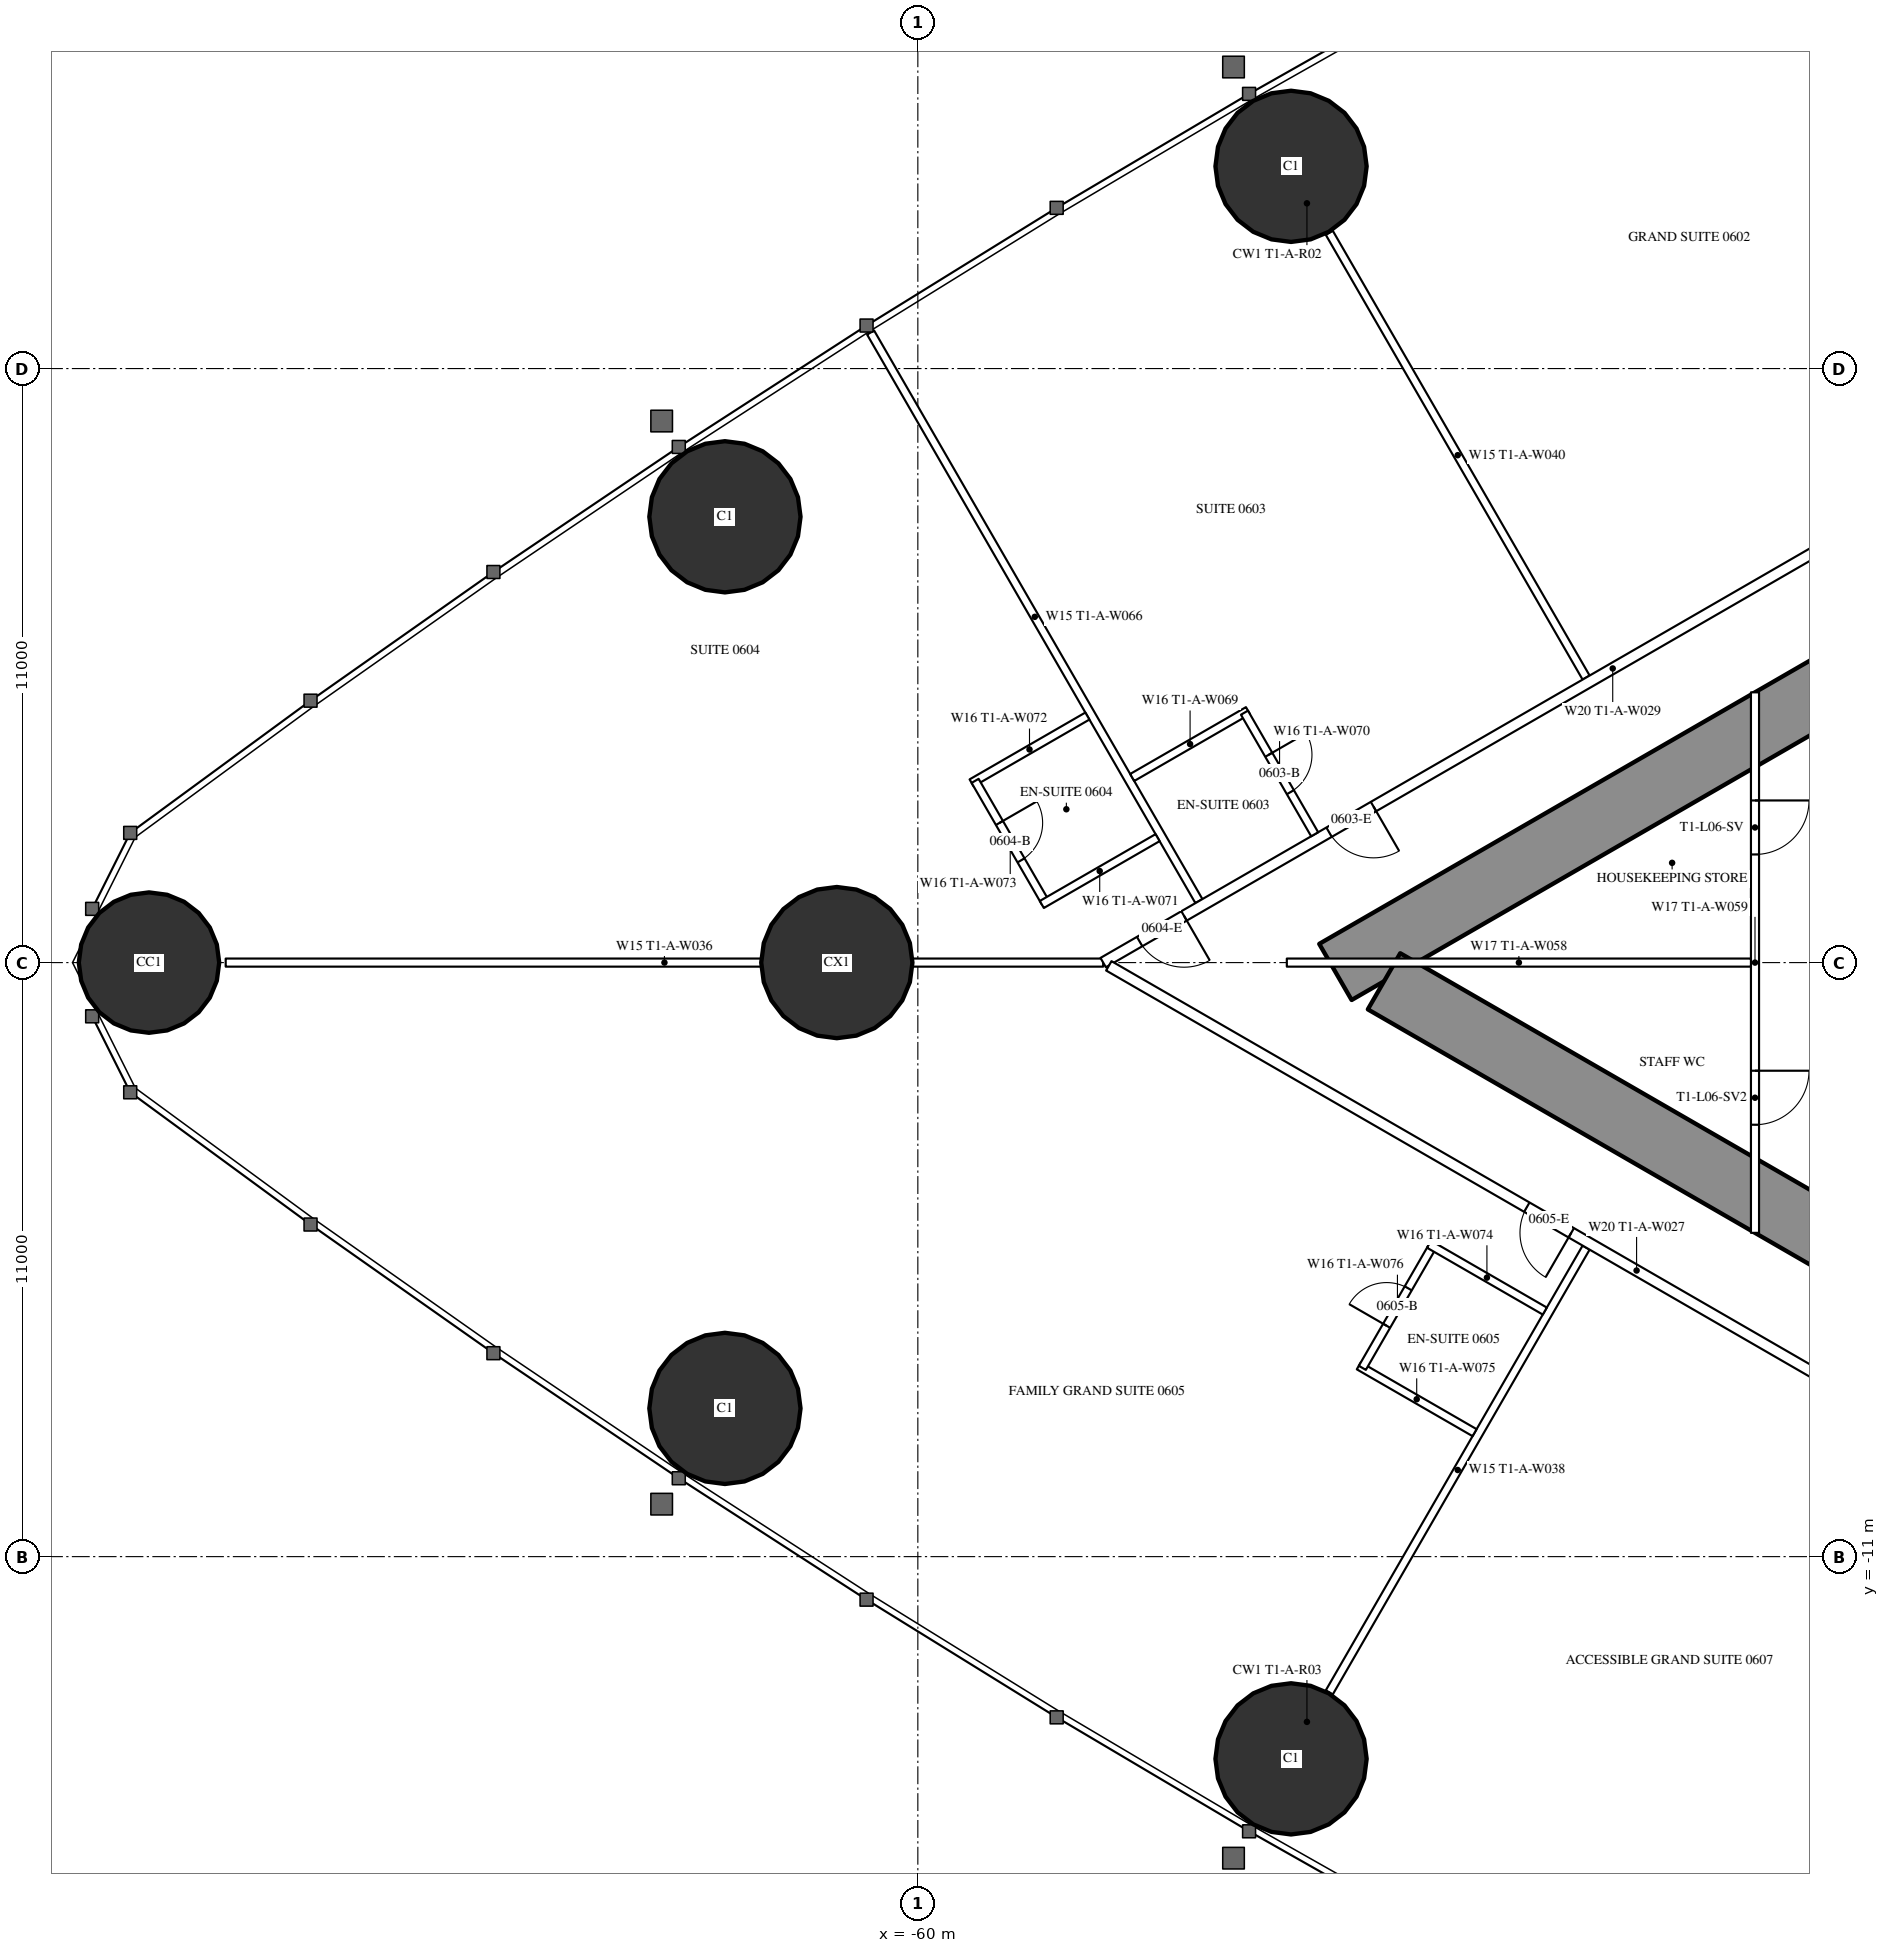
"""IFC4 building model, lengths in metres.
Left out: names, types, materials, properties, quantities, classifications, styles, units other than length and angle.
Written with IfcOpenShell. Run it as: python <this file> out.ifc"""

import sys

from ifc_helpers import new_model, si_unit, direction, frame, frame_2d, origin, origin_2d, place, context, subcontext, project, spatial, rectangle, hollow_circle, extrude, element, fill, save


model = new_model("IFC4")
c1 = context("Model", 3, precision=1e-05, world=origin(), true_north=direction((0.0, 1.0)))
c2 = subcontext(c1, "Body", "Model", "MODEL_VIEW")
j1 = project(units=[si_unit("LENGTHUNIT", "METRE"), si_unit("PLANEANGLEUNIT", "RADIAN")], contexts=[c1])
p1 = place(None, origin())
s1 = spatial("IfcSite", under=j1, at=p1, CompositionType="ELEMENT")
p2 = place(p1, origin())
s2 = spatial("IfcBuilding", under=s1, at=p2, CompositionType="ELEMENT")
p3 = place(p2, frame((0.0, 0.0, 28.5)))
s3 = spatial("IfcBuildingStorey", under=s2, at=p3, CompositionType="ELEMENT", Elevation=28.5)
p4 = place(p3, frame((-74.235, 0.0, 0.0), z_axis=(0.0, 0.0, 1.0), x_axis=(1.0, 0.0, 0.0)))
e1 = element("IfcColumn", 1, at=p4, inside=s3, PredefinedType="COLUMN", context=c2, shape_type="SweptSolid", body=[
    extrude(hollow_circle(Radius=1.3, WallThickness=0.1, at=origin_2d()), origin(), (0.0, 0.0, 1.0), 3.5),
])
for number, where, z_axis, x_axis in (
    (2, (-63.572, -8.255, 0.0), (0.0, 0.0, 1.0), (1.0, 0.0, 0.0)),
    (3, (-53.09, -14.745, 0.0), (0.0, 0.0, 1.0), (1.0, 0.0, 0.0)),
    (4, (-53.09, 14.745, 0.0), (0.0, 0.0, 1.0), (1.0, 0.0, 0.0)),
    (5, (-63.572, 8.255, 0.0), (0.0, 0.0, 1.0), (1.0, 0.0, 0.0)),
):
    element("IfcColumn", number, at=place(p3, frame(where, z_axis=z_axis, x_axis=x_axis)), inside=s3, PredefinedType="COLUMN", context=c2, shape_type="SweptSolid", body=[
        extrude(hollow_circle(Radius=1.4, WallThickness=0.12, at=origin_2d()), origin(), (0.0, 0.0, 1.0), 3.5),
    ])
p5 = place(p3, frame((-61.5, 0.0, 0.0), z_axis=(0.0, 0.0, 1.0), x_axis=(1.0, 0.0, 0.0)))
e6 = element("IfcColumn", 6, at=p5, inside=s3, PredefinedType="COLUMN", context=c2, shape_type="SweptSolid", body=[
    extrude(hollow_circle(Radius=1.4, WallThickness=0.1, at=origin_2d()), origin(), (0.0, 0.0, 1.0), 3.5),
])
p6 = place(p3, frame((-27.2, 14.3, 0.0), z_axis=(0.0, 0.0, 1.0), x_axis=(-0.866026593062, -0.499997940104, 0.0)))
e7 = element("IfcWall", 7, at=p6, inside=s3, PredefinedType="SHEAR", context=c2, shape_type="SweptSolid", body=[
    extrude(rectangle(XDim=28.946, YDim=1.2, at=frame_2d((14.473, 0.0))), origin(), (0.0, 0.0, 1.0), 3.5),
])
p7 = place(p6, frame((4.6, 0.0, 0.0)))
e8 = element("IfcOpeningElement", 8, at=p7, cuts=e7, PredefinedType="OPENING", context=c2, shape_type="SweptSolid", body=[
    extrude(rectangle(XDim=1.0, YDim=2.2, at=frame_2d((0.5, 1.1))), frame((0.0, 0.61, 0.0), z_axis=(0.0, -1.0, 0.0), x_axis=(1.0, 0.0, 0.0)), (0.0, 0.0, 1.0), 1.22),
])
p8 = place(p6, frame((13.395, 0.0, 0.0)))
e9 = element("IfcOpeningElement", 9, at=p8, cuts=e7, PredefinedType="OPENING", context=c2, shape_type="SweptSolid", body=[
    extrude(rectangle(XDim=1.8, YDim=2.2, at=frame_2d((0.9, 1.1))), frame((0.0, 0.61, 0.0), z_axis=(0.0, -1.0, 0.0), x_axis=(1.0, 0.0, 0.0)), (0.0, 0.0, 1.0), 1.22),
])
p9 = place(p3, frame((-27.2, -14.3, 0.0), z_axis=(0.0, 0.0, 1.0), x_axis=(-0.866024021859, 0.500002393557, 0.0)))
e10 = element("IfcWall", 10, at=p9, inside=s3, PredefinedType="SHEAR", context=c2, shape_type="SweptSolid", body=[
    extrude(rectangle(XDim=27.907, YDim=1.2, at=frame_2d((13.954, 0.0))), origin(), (0.0, 0.0, 1.0), 3.5),
])
p10 = place(p9, frame((4.6, 0.0, 0.0)))
e11 = element("IfcOpeningElement", 11, at=p10, cuts=e10, PredefinedType="OPENING", context=c2, shape_type="SweptSolid", body=[
    extrude(rectangle(XDim=1.0, YDim=2.2, at=frame_2d((0.5, 1.1))), frame((0.0, 0.61, 0.0), z_axis=(0.0, -1.0, 0.0), x_axis=(1.0, 0.0, 0.0)), (0.0, 0.0, 1.0), 1.22),
])
p11 = place(p9, frame((13.395, 0.0, 0.0)))
e12 = element("IfcOpeningElement", 12, at=p11, cuts=e10, PredefinedType="OPENING", context=c2, shape_type="SweptSolid", body=[
    extrude(rectangle(XDim=1.8, YDim=2.2, at=frame_2d((0.9, 1.1))), frame((0.0, 0.61, 0.0), z_axis=(0.0, -1.0, 0.0), x_axis=(1.0, 0.0, 0.0)), (0.0, 0.0, 1.0), 1.22),
])
p12 = place(p3, frame((-47.627, 5.278, 0.0), z_axis=(0.0, 0.0, 1.0), x_axis=(-0.500009844318, 0.86601972009, 0.0)))
e13 = element("IfcWall", 13, at=p12, inside=s3, PredefinedType="PARTITIONING", context=c2, shape_type="SweptSolid", body=[
    extrude(rectangle(XDim=9.51, YDim=0.15, at=frame_2d((4.755, 0.0))), origin(), (0.0, 0.0, 1.0), 2.25),
])
p13 = place(p3, frame((-54.796, 1.139, 0.0), z_axis=(0.0, 0.0, 1.0), x_axis=(-0.499998860433, 0.866026061713, 0.0)))
e14 = element("IfcWall", 14, at=p13, inside=s3, PredefinedType="PARTITIONING", context=c2, shape_type="SweptSolid", body=[
    extrude(rectangle(XDim=12.157, YDim=0.15, at=frame_2d((6.078, 0.0))), origin(), (0.0, 0.0, 1.0), 3.25),
])
p14 = place(p3, frame((-47.627, -5.278, 0.0), z_axis=(0.0, 0.0, 1.0), x_axis=(-0.500009844318, -0.86601972009, 0.0)))
e15 = element("IfcWall", 15, at=p14, inside=s3, PredefinedType="PARTITIONING", context=c2, shape_type="SweptSolid", body=[
    extrude(rectangle(XDim=9.51, YDim=0.15, at=frame_2d((4.755, 0.0))), origin(), (0.0, 0.0, 1.0), 2.25),
])
p15 = place(p3, frame((-56.568, 0.0, 0.0), z_axis=(0.0, 0.0, 1.0), x_axis=(-1.0, 0.0, 0.0)))
e16 = element("IfcWall", 16, at=p15, inside=s3, PredefinedType="PARTITIONING", context=c2, shape_type="SweptSolid", body=[
    extrude(rectangle(XDim=16.247, YDim=0.15, at=frame_2d((8.124, 0.0))), origin(), (0.0, 0.0, 1.0), 2.25),
])
p16 = place(p3, frame((-37.7, 10.894, 0.0), z_axis=(0.0, 0.0, 1.0), x_axis=(-0.866027905338, -0.499995667157, 0.0)))
e17 = element("IfcWall", 17, at=p16, inside=s3, PredefinedType="PARTITIONING", context=c2, shape_type="SweptSolid", body=[
    extrude(rectangle(XDim=21.787, YDim=0.2, at=frame_2d((10.894, 0.0))), origin(), (0.0, 0.0, 1.0), 3.25),
])
p17 = place(p16, frame((16.008, 0.0, 0.0)))
e18 = element("IfcOpeningElement", 18, at=p17, cuts=e17, PredefinedType="OPENING", context=c2, shape_type="SweptSolid", body=[
    extrude(rectangle(XDim=0.95, YDim=2.2, at=frame_2d((0.475, 1.1))), frame((0.0, 0.11, 0.0), z_axis=(0.0, -1.0, 0.0), x_axis=(1.0, 0.0, 0.0)), (0.0, 0.0, 1.0), 0.22),
])
p18 = place(p16, frame((20.058, 0.0, 0.0)))
e19 = element("IfcOpeningElement", 19, at=p18, cuts=e17, PredefinedType="OPENING", context=c2, shape_type="SweptSolid", body=[
    extrude(rectangle(XDim=0.95, YDim=2.2, at=frame_2d((0.475, 1.1))), frame((0.0, 0.11, 0.0), z_axis=(0.0, -1.0, 0.0), x_axis=(1.0, 0.0, 0.0)), (0.0, 0.0, 1.0), 0.22),
])
p19 = place(p16, frame((2.95, 0.0, 0.0)))
e20 = element("IfcOpeningElement", 20, at=p19, cuts=e17, PredefinedType="OPENING", context=c2, shape_type="SweptSolid", body=[
    extrude(rectangle(XDim=0.95, YDim=2.2, at=frame_2d((0.475, 1.1))), frame((0.0, 0.11, 0.0), z_axis=(0.0, -1.0, 0.0), x_axis=(1.0, 0.0, 0.0)), (0.0, 0.0, 1.0), 0.22),
])
p20 = place(p3, frame((-36.92, -11.344, 0.0), z_axis=(0.0, 0.0, 1.0), x_axis=(-0.866028313256, 0.499994960614, 0.0)))
e21 = element("IfcWall", 21, at=p20, inside=s3, PredefinedType="PARTITIONING", context=c2, shape_type="SweptSolid", body=[
    extrude(rectangle(XDim=22.568, YDim=0.2, at=frame_2d((11.284, 0.0))), origin(), (0.0, 0.0, 1.0), 3.25),
])
p21 = place(p20, frame((12.68, 0.0, 0.0)))
e22 = element("IfcOpeningElement", 22, at=p21, cuts=e21, PredefinedType="OPENING", context=c2, shape_type="SweptSolid", body=[
    extrude(rectangle(XDim=0.95, YDim=2.2, at=frame_2d((0.475, 1.1))), frame((0.0, 0.11, 0.0), z_axis=(0.0, -1.0, 0.0), x_axis=(1.0, 0.0, 0.0)), (0.0, 0.0, 1.0), 0.22),
])
p22 = place(p20, frame((3.35, 0.0, 0.0)))
e23 = element("IfcOpeningElement", 23, at=p22, cuts=e21, PredefinedType="OPENING", context=c2, shape_type="SweptSolid", body=[
    extrude(rectangle(XDim=1.0, YDim=2.2, at=frame_2d((0.5, 1.1))), frame((0.0, 0.11, 0.0), z_axis=(0.0, -1.0, 0.0), x_axis=(1.0, 0.0, 0.0)), (0.0, 0.0, 1.0), 0.22),
])
p23 = place(p3, frame((-53.888, 4.665, 0.0), z_axis=(0.0, 0.0, 1.0), x_axis=(-0.866006523861, -0.500032699561, 0.0)))
e24 = element("IfcWall", 24, at=p23, inside=s3, PredefinedType="PARTITIONING", context=c2, shape_type="SweptSolid", body=[
    extrude(rectangle(XDim=2.475, YDim=0.15, at=frame_2d((1.237, 0.0))), origin(), (0.0, 0.0, 1.0), 3.25),
])
p24 = place(p3, frame((-52.653, 2.376, 0.0), z_axis=(0.0, 0.0, 1.0), x_axis=(-0.500006934395, 0.866021400173, 0.0)))
e25 = element("IfcWall", 25, at=p24, inside=s3, PredefinedType="PARTITIONING", context=c2, shape_type="SweptSolid", body=[
    extrude(rectangle(XDim=2.6, YDim=0.15, at=frame_2d((1.3, 0.0))), origin(), (0.0, 0.0, 1.0), 3.25),
])
p25 = place(p24, frame((0.9, 0.0, 0.0)))
e26 = element("IfcOpeningElement", 26, at=p25, cuts=e25, PredefinedType="OPENING", context=c2, shape_type="SweptSolid", body=[
    extrude(rectangle(XDim=0.8, YDim=2.2, at=frame_2d((0.4, 1.1))), frame((0.0, 0.085, 0.0), z_axis=(0.0, -1.0, 0.0), x_axis=(1.0, 0.0, 0.0)), (0.0, 0.0, 1.0), 0.17),
])
p26 = place(p3, frame((-56.861, 4.565, 0.0), z_axis=(0.0, 0.0, 1.0), x_axis=(-0.86604923931, -0.499958713387, 0.0)))
e27 = element("IfcWall", 27, at=p26, inside=s3, PredefinedType="PARTITIONING", context=c2, shape_type="SweptSolid", body=[
    extrude(rectangle(XDim=2.475, YDim=0.15, at=frame_2d((1.237, 0.0))), origin(), (0.0, 0.0, 1.0), 3.25),
])
p27 = place(p3, frame((-57.639, 1.114, 0.0), z_axis=(0.0, 0.0, 1.0), x_axis=(-0.500006934395, 0.866021400173, 0.0)))
e28 = element("IfcWall", 28, at=p27, inside=s3, PredefinedType="PARTITIONING", context=c2, shape_type="SweptSolid", body=[
    extrude(rectangle(XDim=2.6, YDim=0.15, at=frame_2d((1.3, 0.0))), origin(), (0.0, 0.0, 1.0), 3.25),
])
p28 = place(p27, frame((0.9, 0.0, 0.0)))
e29 = element("IfcOpeningElement", 29, at=p28, cuts=e28, PredefinedType="OPENING", context=c2, shape_type="SweptSolid", body=[
    extrude(rectangle(XDim=0.8, YDim=2.2, at=frame_2d((0.4, 1.1))), frame((0.0, 0.085, 0.0), z_axis=(0.0, -1.0, 0.0), x_axis=(1.0, 0.0, 0.0)), (0.0, 0.0, 1.0), 0.17),
])
p29 = place(p3, frame((-55.561, 2.313, 0.0), z_axis=(0.0, 0.0, 1.0), x_axis=(-0.86604923931, -0.499958713387, 0.0)))
e30 = element("IfcWall", 30, at=p29, inside=s3, PredefinedType="PARTITIONING", context=c2, shape_type="SweptSolid", body=[
    extrude(rectangle(XDim=2.475, YDim=0.15, at=frame_2d((1.237, 0.0))), origin(), (0.0, 0.0, 1.0), 3.25),
])
p30 = place(p3, frame((-49.692, -8.704, 0.0), z_axis=(0.0, 0.0, 1.0), x_axis=(-0.866073894602, 0.499916002032, 0.0)))
e31 = element("IfcWall", 31, at=p30, inside=s3, PredefinedType="PARTITIONING", context=c2, shape_type="SweptSolid", body=[
    extrude(rectangle(XDim=2.475, YDim=0.15, at=frame_2d((1.238, 0.0))), origin(), (0.0, 0.0, 1.0), 3.25),
])
p31 = place(p3, frame((-50.47, -5.253, 0.0), z_axis=(0.0, 0.0, 1.0), x_axis=(-0.500006934395, -0.866021400173, 0.0)))
e32 = element("IfcWall", 32, at=p31, inside=s3, PredefinedType="PARTITIONING", context=c2, shape_type="SweptSolid", body=[
    extrude(rectangle(XDim=2.6, YDim=0.15, at=frame_2d((1.3, 0.0))), origin(), (0.0, 0.0, 1.0), 3.25),
])
p32 = place(p31, frame((0.9, 0.0, 0.0)))
e33 = element("IfcOpeningElement", 33, at=p32, cuts=e32, PredefinedType="OPENING", context=c2, shape_type="SweptSolid", body=[
    extrude(rectangle(XDim=0.8, YDim=2.2, at=frame_2d((0.4, 1.1))), frame((0.0, 0.085, 0.0), z_axis=(0.0, -1.0, 0.0), x_axis=(1.0, 0.0, 0.0)), (0.0, 0.0, 1.0), 0.17),
])
p33 = place(p3, frame((-48.392, -6.453, 0.0), z_axis=(0.0, 0.0, 1.0), x_axis=(-0.86604923931, 0.499958713387, 0.0)))
e34 = element("IfcWall", 34, at=p33, inside=s3, PredefinedType="PARTITIONING", context=c2, shape_type="SweptSolid", body=[
    extrude(rectangle(XDim=2.475, YDim=0.15, at=frame_2d((1.237, 0.0))), origin(), (0.0, 0.0, 1.0), 3.25),
])
p34 = place(p3, frame((-44.5, 5.005, 0.0), z_axis=(0.0, 0.0, 1.0), x_axis=(0.0, -1.0, 0.0)))
e35 = element("IfcWall", 35, at=p34, inside=s3, PredefinedType="PARTITIONING", context=c2, shape_type="SweptSolid", body=[
    extrude(rectangle(XDim=10.009, YDim=0.15, at=frame_2d((5.005, 0.0))), origin(), (0.0, 0.0, 1.0), 2.45),
])
p35 = place(p34, frame((2.002, 0.0, 0.0)))
e36 = element("IfcOpeningElement", 36, at=p35, cuts=e35, PredefinedType="OPENING", context=c2, shape_type="SweptSolid", body=[
    extrude(rectangle(XDim=1.0, YDim=2.2, at=frame_2d((0.5, 1.1))), frame((0.0, 0.085, 0.0), z_axis=(0.0, -1.0, 0.0), x_axis=(1.0, 0.0, 0.0)), (0.0, 0.0, 1.0), 0.17),
])
p36 = place(p34, frame((7.007, 0.0, 0.0)))
e37 = element("IfcOpeningElement", 37, at=p36, cuts=e35, PredefinedType="OPENING", context=c2, shape_type="SweptSolid", body=[
    extrude(rectangle(XDim=1.0, YDim=2.2, at=frame_2d((0.5, 1.1))), frame((0.0, 0.085, 0.0), z_axis=(0.0, -1.0, 0.0), x_axis=(1.0, 0.0, 0.0)), (0.0, 0.0, 1.0), 0.17),
])
p37 = place(p3, frame((-44.575, 0.0, 0.0), z_axis=(0.0, 0.0, 1.0), x_axis=(-1.0, 0.0, 0.0)))
e38 = element("IfcWall", 38, at=p37, inside=s3, PredefinedType="PARTITIONING", context=c2, shape_type="SweptSolid", body=[
    extrude(rectangle(XDim=8.593, YDim=0.15, at=frame_2d((4.297, 0.0))), origin(), (0.0, 0.0, 1.0), 2.25),
])
p38 = place(p25, origin())
e39 = element("IfcDoor", 39, at=p38, inside=s3, OperationType="SINGLE_SWING_RIGHT", PredefinedType="DOOR", context=c2, shape_type="SweptSolid", body=[
    extrude(rectangle(XDim=0.8, YDim=2.2, at=frame_2d((0.4, 1.1))), frame((0.0, 0.025, 0.0), z_axis=(0.0, -1.0, 0.0), x_axis=(1.0, 0.0, 0.0)), (0.0, 0.0, 1.0), 0.05),
])
fill(e26, e39)
p39 = place(p17, origin())
e40 = element("IfcDoor", 40, at=p39, inside=s3, OperationType="SINGLE_SWING_LEFT", PredefinedType="DOOR", context=c2, shape_type="SweptSolid", body=[
    extrude(rectangle(XDim=0.95, YDim=2.2, at=frame_2d((0.475, 1.1))), frame((0.0, 0.025, 0.0), z_axis=(0.0, -1.0, 0.0), x_axis=(1.0, 0.0, 0.0)), (0.0, 0.0, 1.0), 0.05),
])
fill(e18, e40)
p40 = place(p28, origin())
e41 = element("IfcDoor", 41, at=p40, inside=s3, OperationType="SINGLE_SWING_RIGHT", PredefinedType="DOOR", context=c2, shape_type="SweptSolid", body=[
    extrude(rectangle(XDim=0.8, YDim=2.2, at=frame_2d((0.4, 1.1))), frame((0.0, 0.025, 0.0), z_axis=(0.0, -1.0, 0.0), x_axis=(1.0, 0.0, 0.0)), (0.0, 0.0, 1.0), 0.05),
])
fill(e29, e41)
p41 = place(p18, origin())
e42 = element("IfcDoor", 42, at=p41, inside=s3, OperationType="SINGLE_SWING_LEFT", PredefinedType="DOOR", context=c2, shape_type="SweptSolid", body=[
    extrude(rectangle(XDim=0.95, YDim=2.2, at=frame_2d((0.475, 1.1))), frame((0.0, 0.025, 0.0), z_axis=(0.0, -1.0, 0.0), x_axis=(1.0, 0.0, 0.0)), (0.0, 0.0, 1.0), 0.05),
])
fill(e19, e42)
p42 = place(p32, origin())
e43 = element("IfcDoor", 43, at=p42, inside=s3, OperationType="SINGLE_SWING_RIGHT", PredefinedType="DOOR", context=c2, shape_type="SweptSolid", body=[
    extrude(rectangle(XDim=0.8, YDim=2.2, at=frame_2d((0.4, 1.1))), frame((0.0, 0.025, 0.0), z_axis=(0.0, -1.0, 0.0), x_axis=(1.0, 0.0, 0.0)), (0.0, 0.0, 1.0), 0.05),
])
fill(e33, e43)
p43 = place(p21, origin())
e44 = element("IfcDoor", 44, at=p43, inside=s3, OperationType="SINGLE_SWING_LEFT", PredefinedType="DOOR", context=c2, shape_type="SweptSolid", body=[
    extrude(rectangle(XDim=0.95, YDim=2.2, at=frame_2d((0.475, 1.1))), frame((0.0, 0.025, 0.0), z_axis=(0.0, -1.0, 0.0), x_axis=(1.0, 0.0, 0.0)), (0.0, 0.0, 1.0), 0.05),
])
fill(e22, e44)
p44 = place(p35, origin())
e45 = element("IfcDoor", 45, at=p44, inside=s3, OperationType="SINGLE_SWING_LEFT", PredefinedType="DOOR", context=c2, shape_type="SweptSolid", body=[
    extrude(rectangle(XDim=1.0, YDim=2.2, at=frame_2d((0.5, 1.1))), frame((0.0, 0.025, 0.0), z_axis=(0.0, -1.0, 0.0), x_axis=(1.0, 0.0, 0.0)), (0.0, 0.0, 1.0), 0.05),
])
fill(e36, e45)
p45 = place(p36, origin())
e46 = element("IfcDoor", 46, at=p45, inside=s3, OperationType="SINGLE_SWING_LEFT", PredefinedType="DOOR", context=c2, shape_type="SweptSolid", body=[
    extrude(rectangle(XDim=1.0, YDim=2.2, at=frame_2d((0.5, 1.1))), frame((0.0, 0.025, 0.0), z_axis=(0.0, -1.0, 0.0), x_axis=(1.0, 0.0, 0.0)), (0.0, 0.0, 1.0), 0.05),
])
fill(e37, e46)
save(model, sys.argv[1])
